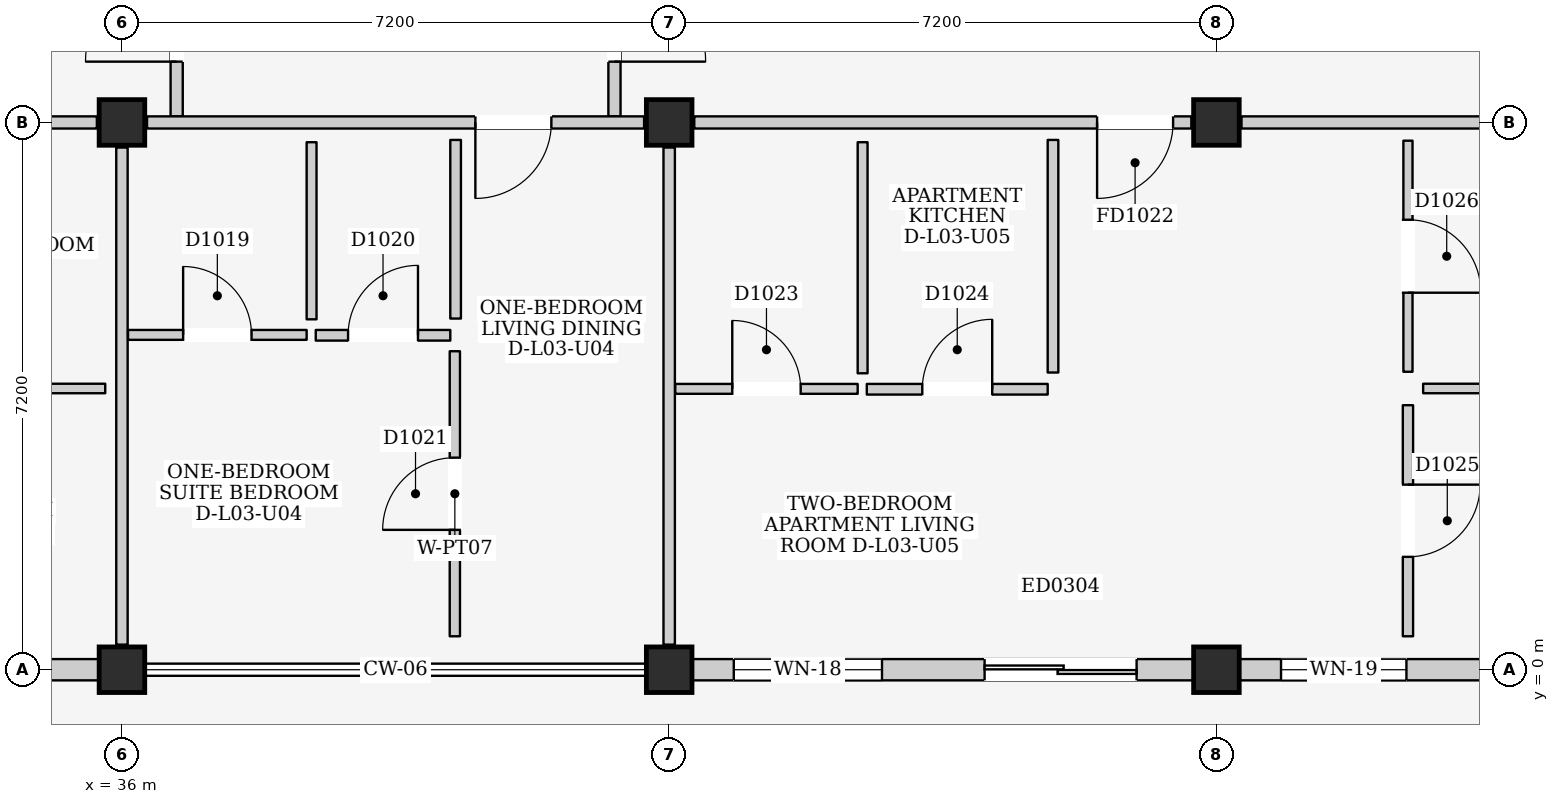
"""IFC4 building model, lengths in metres.
Left out: names, types, materials, properties, quantities, classifications, styles, units other than length and angle.
Written with IfcOpenShell. Run it as: python <this file> out.ifc"""

import sys

from ifc_helpers import new_model, si_unit, direction, frame, frame_2d, origin, origin_2d, place, context, subcontext, project, spatial, rectangle, extrude, element, fill, save


model = new_model("IFC4")
c1 = context("Model", 3, precision=1e-05, world=origin(), true_north=direction((0.0, 1.0)))
c2 = subcontext(c1, "Body", "Model", "MODEL_VIEW")
j1 = project(units=[si_unit("LENGTHUNIT", "METRE"), si_unit("PLANEANGLEUNIT", "RADIAN")], contexts=[c1])
p1 = place(None, origin())
s1 = spatial("IfcSite", under=j1, at=p1, CompositionType="ELEMENT")
p2 = place(p1, origin())
s2 = spatial("IfcBuilding", under=s1, at=p2, CompositionType="ELEMENT")
p3 = place(p2, frame((0.0, 0.0, 12.2)))
s3 = spatial("IfcBuildingStorey", under=s2, at=p3, CompositionType="ELEMENT", Elevation=12.2)
for number, where, z_axis, x_axis in (
    (1, (36.0, 0.0, 0.0), (0.0, 0.0, 1.0), (1.0, 0.0, 0.0)),
    (2, (36.0, 7.2, 0.0), (0.0, 0.0, 1.0), (1.0, 0.0, 0.0)),
    (3, (43.2, 0.0, 0.0), (0.0, 0.0, 1.0), (1.0, 0.0, 0.0)),
    (4, (43.2, 7.2, 0.0), (0.0, 0.0, 1.0), (1.0, 0.0, 0.0)),
    (5, (50.4, 0.0, 0.0), (0.0, 0.0, 1.0), (1.0, 0.0, 0.0)),
    (6, (50.4, 7.2, 0.0), (0.0, 0.0, 1.0), (1.0, 0.0, 0.0)),
):
    element("IfcColumn", number, at=place(p3, frame(where, z_axis=z_axis, x_axis=x_axis)), inside=s3, PredefinedType="COLUMN", context=c2, shape_type="SweptSolid", body=[
        extrude(rectangle(XDim=0.6, YDim=0.6, at=origin_2d()), origin(), (0.0, 0.0, 1.0), 3.2),
    ])
p4 = place(p3, frame((29.1, 0.0, 0.0), z_axis=(0.0, 0.0, 1.0), x_axis=(1.0, 0.0, 0.0)))
e7 = element("IfcWall", 7, at=p4, inside=s3, PredefinedType="ELEMENTEDWALL", context=c2, shape_type="SweptSolid", body=[
    extrude(rectangle(XDim=6.6, YDim=0.28, at=frame_2d((3.3, 0.0))), origin(), (0.0, 0.0, 1.0), 2.445),
])
p5 = place(p4, frame((3.85, 0.0, 0.0)))
e8 = element("IfcOpeningElement", 8, at=p5, cuts=e7, PredefinedType="OPENING", context=c2, shape_type="SweptSolid", body=[
    extrude(rectangle(XDim=1.5, YDim=2.12, at=frame_2d((0.75, 1.06))), frame((0.0, 0.155, 0.0), z_axis=(0.0, -1.0, 0.0), x_axis=(1.0, 0.0, 0.0)), (0.0, 0.0, 1.0), 0.31),
])
p6 = place(p4, frame((0.55, 0.0, 0.9)))
e9 = element("IfcOpeningElement", 9, at=p6, cuts=e7, PredefinedType="OPENING", context=c2, shape_type="SweptSolid", body=[
    extrude(rectangle(XDim=1.45, YDim=1.4, at=frame_2d((0.725, 0.7))), frame((0.0, 0.155, 0.0), z_axis=(0.0, -1.0, 0.0), x_axis=(1.0, 0.0, 0.0)), (0.0, 0.0, 1.0), 0.31),
])
p7 = place(p3, frame((43.5, 0.0, 0.0), z_axis=(0.0, 0.0, 1.0), x_axis=(1.0, 0.0, 0.0)))
e10 = element("IfcWall", 10, at=p7, inside=s3, PredefinedType="ELEMENTEDWALL", context=c2, shape_type="SweptSolid", body=[
    extrude(rectangle(XDim=6.6, YDim=0.28, at=frame_2d((3.3, 0.0))), origin(), (0.0, 0.0, 1.0), 2.445),
])
p8 = place(p7, frame((3.85, 0.0, 0.0)))
e11 = element("IfcOpeningElement", 11, at=p8, cuts=e10, PredefinedType="OPENING", context=c2, shape_type="SweptSolid", body=[
    extrude(rectangle(XDim=2.0, YDim=2.12, at=frame_2d((1.0, 1.06))), frame((0.0, 0.155, 0.0), z_axis=(0.0, -1.0, 0.0), x_axis=(1.0, 0.0, 0.0)), (0.0, 0.0, 1.0), 0.31),
])
p9 = place(p7, frame((0.55, 0.0, 0.785)))
e12 = element("IfcOpeningElement", 12, at=p9, cuts=e10, PredefinedType="OPENING", context=c2, shape_type="SweptSolid", body=[
    extrude(rectangle(XDim=1.95, YDim=1.55, at=frame_2d((0.975, 0.775))), frame((0.0, 0.155, 0.0), z_axis=(0.0, -1.0, 0.0), x_axis=(1.0, 0.0, 0.0)), (0.0, 0.0, 1.0), 0.31),
])
p10 = place(p3, frame((50.7, 0.0, 0.0), z_axis=(0.0, 0.0, 1.0), x_axis=(1.0, 0.0, 0.0)))
e13 = element("IfcWall", 13, at=p10, inside=s3, PredefinedType="ELEMENTEDWALL", context=c2, shape_type="SweptSolid", body=[
    extrude(rectangle(XDim=6.6, YDim=0.28, at=frame_2d((3.3, 0.0))), origin(), (0.0, 0.0, 1.0), 2.445),
])
p11 = place(p10, frame((3.85, 0.0, 0.0)))
e14 = element("IfcOpeningElement", 14, at=p11, cuts=e13, PredefinedType="OPENING", context=c2, shape_type="SweptSolid", body=[
    extrude(rectangle(XDim=1.4, YDim=2.1, at=frame_2d((0.7, 1.05))), frame((0.0, 0.155, 0.0), z_axis=(0.0, -1.0, 0.0), x_axis=(1.0, 0.0, 0.0)), (0.0, 0.0, 1.0), 0.31),
])
p12 = place(p10, frame((0.55, 0.0, 0.9)))
e15 = element("IfcOpeningElement", 15, at=p12, cuts=e13, PredefinedType="OPENING", context=c2, shape_type="SweptSolid", body=[
    extrude(rectangle(XDim=1.65, YDim=1.35, at=frame_2d((0.825, 0.675))), frame((0.0, 0.155, 0.0), z_axis=(0.0, -1.0, 0.0), x_axis=(1.0, 0.0, 0.0)), (0.0, 0.0, 1.0), 0.31),
])
p13 = place(p3, frame((36.72, 7.28, 0.0), z_axis=(0.0, 0.0, 1.0), x_axis=(0.0, 1.0, 0.0)))
e16 = element("IfcWall", 16, at=p13, inside=s3, PredefinedType="PARTITIONING", context=c2, shape_type="SweptSolid", body=[
    extrude(rectangle(XDim=4.32, YDim=0.16, at=frame_2d((2.16, 0.0))), origin(), (0.0, 0.0, 1.0), 2.98),
])
p14 = place(p13, frame((0.72, 0.0, 0.0)))
e17 = element("IfcOpeningElement", 17, at=p14, cuts=e16, PredefinedType="OPENING", context=c2, shape_type="SweptSolid", body=[
    extrude(rectangle(XDim=1.2, YDim=2.2, at=frame_2d((0.6, 1.1))), frame((0.0, 0.095, 0.0), z_axis=(0.0, -1.0, 0.0), x_axis=(1.0, 0.0, 0.0)), (0.0, 0.0, 1.0), 0.19),
])
p15 = place(p3, frame((42.48, 7.28, 0.0), z_axis=(0.0, 0.0, 1.0), x_axis=(0.0, 1.0, 0.0)))
e18 = element("IfcWall", 18, at=p15, inside=s3, PredefinedType="PARTITIONING", context=c2, shape_type="SweptSolid", body=[
    extrude(rectangle(XDim=4.32, YDim=0.16, at=frame_2d((2.16, 0.0))), origin(), (0.0, 0.0, 1.0), 2.98),
])
p16 = place(p15, frame((0.72, 0.0, 0.0)))
e19 = element("IfcOpeningElement", 19, at=p16, cuts=e18, PredefinedType="OPENING", context=c2, shape_type="SweptSolid", body=[
    extrude(rectangle(XDim=1.2, YDim=2.2, at=frame_2d((0.6, 1.1))), frame((0.0, 0.095, 0.0), z_axis=(0.0, -1.0, 0.0), x_axis=(1.0, 0.0, 0.0)), (0.0, 0.0, 1.0), 0.19),
])
p17 = place(p3, frame((29.13, 7.2, 0.0), z_axis=(0.0, 0.0, 1.0), x_axis=(1.0, 0.0, 0.0)))
e20 = element("IfcWall", 20, at=p17, inside=s3, PredefinedType="PARTITIONING", context=c2, shape_type="SweptSolid", body=[
    extrude(rectangle(XDim=6.54, YDim=0.16, at=frame_2d((3.27, 0.0))), origin(), (0.0, 0.0, 1.0), 2.365),
])
p18 = place(p17, frame((0.18, 0.0, 0.0)))
e21 = element("IfcOpeningElement", 21, at=p18, cuts=e20, PredefinedType="OPENING", context=c2, shape_type="SweptSolid", body=[
    extrude(rectangle(XDim=1.0, YDim=2.15, at=frame_2d((0.5, 1.075))), frame((0.0, 0.095, 0.0), z_axis=(0.0, -1.0, 0.0), x_axis=(1.0, 0.0, 0.0)), (0.0, 0.0, 1.0), 0.19),
])
p19 = place(p3, frame((36.0, 0.33, 0.0), z_axis=(0.0, 0.0, 1.0), x_axis=(0.0, 1.0, 0.0)))
e22 = element("IfcWall", 22, at=p19, inside=s3, PredefinedType="PARTITIONING", context=c2, shape_type="SweptSolid", body=[
    extrude(rectangle(XDim=6.54, YDim=0.15, at=frame_2d((3.27, 0.0))), origin(), (0.0, 0.0, 1.0), 2.415),
])
p20 = place(p3, frame((31.72, 3.7, 0.0), z_axis=(0.0, 0.0, 1.0), x_axis=(1.0, 0.0, 0.0)))
e23 = element("IfcWall", 23, at=p20, inside=s3, PredefinedType="PARTITIONING", context=c2, shape_type="SweptSolid", body=[
    extrude(rectangle(XDim=4.06, YDim=0.125, at=frame_2d((2.03, 0.0))), origin(), (0.0, 0.0, 1.0), 2.98),
])
p21 = place(p3, frame((36.33, 7.2, 0.0), z_axis=(0.0, 0.0, 1.0), x_axis=(1.0, 0.0, 0.0)))
e24 = element("IfcWall", 24, at=p21, inside=s3, PredefinedType="PARTITIONING", context=c2, shape_type="SweptSolid", body=[
    extrude(rectangle(XDim=6.54, YDim=0.16, at=frame_2d((3.27, 0.0))), origin(), (0.0, 0.0, 1.0), 2.365),
])
p22 = place(p21, frame((4.32, 0.0, 0.0)))
e25 = element("IfcOpeningElement", 25, at=p22, cuts=e24, PredefinedType="OPENING", context=c2, shape_type="SweptSolid", body=[
    extrude(rectangle(XDim=1.0, YDim=2.15, at=frame_2d((0.5, 1.075))), frame((0.0, 0.095, 0.0), z_axis=(0.0, -1.0, 0.0), x_axis=(1.0, 0.0, 0.0)), (0.0, 0.0, 1.0), 0.19),
])
p23 = place(p3, frame((43.2, 0.33, 0.0), z_axis=(0.0, 0.0, 1.0), x_axis=(0.0, 1.0, 0.0)))
e26 = element("IfcWall", 26, at=p23, inside=s3, PredefinedType="PARTITIONING", context=c2, shape_type="SweptSolid", body=[
    extrude(rectangle(XDim=6.54, YDim=0.15, at=frame_2d((3.27, 0.0))), origin(), (0.0, 0.0, 1.0), 2.415),
])
p24 = place(p3, frame((36.08, 4.405, 0.0), z_axis=(0.0, 0.0, 1.0), x_axis=(1.0, 0.0, 0.0)))
e27 = element("IfcWall", 27, at=p24, inside=s3, PredefinedType="PARTITIONING", context=c2, shape_type="SweptSolid", body=[
    extrude(rectangle(XDim=2.35, YDim=0.13, at=frame_2d((1.175, 0.0))), origin(), (0.0, 0.0, 1.0), 2.98),
])
p25 = place(p24, frame((0.725, 0.0, 0.0)))
e28 = element("IfcOpeningElement", 28, at=p25, cuts=e27, PredefinedType="OPENING", context=c2, shape_type="SweptSolid", body=[
    extrude(rectangle(XDim=0.9, YDim=2.1, at=frame_2d((0.45, 1.05))), frame((0.0, 0.08, 0.0), z_axis=(0.0, -1.0, 0.0), x_axis=(1.0, 0.0, 0.0)), (0.0, 0.0, 1.0), 0.16),
])
p26 = place(p3, frame((38.495, 4.61, 0.0), z_axis=(0.0, 0.0, 1.0), x_axis=(0.0, 1.0, 0.0)))
e29 = element("IfcWall", 29, at=p26, inside=s3, PredefinedType="PARTITIONING", context=c2, shape_type="SweptSolid", body=[
    extrude(rectangle(XDim=2.33, YDim=0.13, at=frame_2d((1.165, 0.0))), origin(), (0.0, 0.0, 1.0), 2.98),
])
p27 = place(p3, frame((38.55, 4.4, 0.0), z_axis=(0.0, 0.0, 1.0), x_axis=(1.0, 0.0, 0.0)))
e30 = element("IfcWall", 30, at=p27, inside=s3, PredefinedType="PARTITIONING", context=c2, shape_type="SweptSolid", body=[
    extrude(rectangle(XDim=1.77, YDim=0.14, at=frame_2d((0.885, 0.0))), origin(), (0.0, 0.0, 1.0), 2.98),
])
p28 = place(p27, frame((0.425, 0.0, 0.0)))
e31 = element("IfcOpeningElement", 31, at=p28, cuts=e30, PredefinedType="OPENING", context=c2, shape_type="SweptSolid", body=[
    extrude(rectangle(XDim=0.92, YDim=2.1, at=frame_2d((0.46, 1.05))), frame((0.0, 0.085, 0.0), z_axis=(0.0, -1.0, 0.0), x_axis=(1.0, 0.0, 0.0)), (0.0, 0.0, 1.0), 0.17),
])
p29 = place(p3, frame((40.39, 4.62, 0.0), z_axis=(0.0, 0.0, 1.0), x_axis=(0.0, 1.0, 0.0)))
e32 = element("IfcWall", 32, at=p29, inside=s3, PredefinedType="PARTITIONING", context=c2, shape_type="SweptSolid", body=[
    extrude(rectangle(XDim=2.35, YDim=0.14, at=frame_2d((1.175, 0.0))), origin(), (0.0, 0.0, 1.0), 2.98),
])
p30 = place(p3, frame((40.38, 0.44, 0.0), z_axis=(0.0, 0.0, 1.0), x_axis=(0.0, 1.0, 0.0)))
e33 = element("IfcWall", 33, at=p30, inside=s3, PredefinedType="PARTITIONING", context=c2, shape_type="SweptSolid", body=[
    extrude(rectangle(XDim=3.75, YDim=0.135, at=frame_2d((1.875, 0.0))), origin(), (0.0, 0.0, 1.0), 2.98),
])
p31 = place(p30, frame((1.4, 0.0, 0.0)))
e34 = element("IfcOpeningElement", 34, at=p31, cuts=e33, PredefinedType="OPENING", context=c2, shape_type="SweptSolid", body=[
    extrude(rectangle(XDim=0.95, YDim=2.15, at=frame_2d((0.475, 1.075))), frame((0.0, 0.083, 0.0), z_axis=(0.0, -1.0, 0.0), x_axis=(1.0, 0.0, 0.0)), (0.0, 0.0, 1.0), 0.165),
])
p32 = place(p3, frame((43.53, 7.2, 0.0), z_axis=(0.0, 0.0, 1.0), x_axis=(1.0, 0.0, 0.0)))
e35 = element("IfcWall", 35, at=p32, inside=s3, PredefinedType="PARTITIONING", context=c2, shape_type="SweptSolid", body=[
    extrude(rectangle(XDim=6.54, YDim=0.16, at=frame_2d((3.27, 0.0))), origin(), (0.0, 0.0, 1.0), 2.365),
])
p33 = place(p32, frame((5.3, 0.0, 0.0)))
e36 = element("IfcOpeningElement", 36, at=p33, cuts=e35, PredefinedType="OPENING", context=c2, shape_type="SweptSolid", body=[
    extrude(rectangle(XDim=1.0, YDim=2.15, at=frame_2d((0.5, 1.075))), frame((0.0, 0.095, 0.0), z_axis=(0.0, -1.0, 0.0), x_axis=(1.0, 0.0, 0.0)), (0.0, 0.0, 1.0), 0.19),
])
p34 = place(p3, frame((50.73, 7.2, 0.0), z_axis=(0.0, 0.0, 1.0), x_axis=(1.0, 0.0, 0.0)))
e37 = element("IfcWall", 37, at=p34, inside=s3, PredefinedType="PARTITIONING", context=c2, shape_type="SweptSolid", body=[
    extrude(rectangle(XDim=6.54, YDim=0.16, at=frame_2d((3.27, 0.0))), origin(), (0.0, 0.0, 1.0), 2.365),
])
p35 = place(p3, frame((43.28, 3.695, 0.0), z_axis=(0.0, 0.0, 1.0), x_axis=(1.0, 0.0, 0.0)))
e38 = element("IfcWall", 38, at=p35, inside=s3, PredefinedType="PARTITIONING", context=c2, shape_type="SweptSolid", body=[
    extrude(rectangle(XDim=2.4, YDim=0.13, at=frame_2d((1.2, 0.0))), origin(), (0.0, 0.0, 1.0), 2.98),
])
p36 = place(p35, frame((0.75, 0.0, 0.0)))
e39 = element("IfcOpeningElement", 39, at=p36, cuts=e38, PredefinedType="OPENING", context=c2, shape_type="SweptSolid", body=[
    extrude(rectangle(XDim=0.9, YDim=2.1, at=frame_2d((0.45, 1.05))), frame((0.0, 0.08, 0.0), z_axis=(0.0, -1.0, 0.0), x_axis=(1.0, 0.0, 0.0)), (0.0, 0.0, 1.0), 0.16),
])
p37 = place(p3, frame((45.745, 3.9, 0.0), z_axis=(0.0, 0.0, 1.0), x_axis=(0.0, 1.0, 0.0)))
e40 = element("IfcWall", 40, at=p37, inside=s3, PredefinedType="PARTITIONING", context=c2, shape_type="SweptSolid", body=[
    extrude(rectangle(XDim=3.04, YDim=0.13, at=frame_2d((1.52, 0.0))), origin(), (0.0, 0.0, 1.0), 2.98),
])
p38 = place(p3, frame((45.8, 3.69, 0.0), z_axis=(0.0, 0.0, 1.0), x_axis=(1.0, 0.0, 0.0)))
e41 = element("IfcWall", 41, at=p38, inside=s3, PredefinedType="PARTITIONING", context=c2, shape_type="SweptSolid", body=[
    extrude(rectangle(XDim=2.38, YDim=0.14, at=frame_2d((1.19, 0.0))), origin(), (0.0, 0.0, 1.0), 2.98),
])
p39 = place(p38, frame((0.73, 0.0, 0.0)))
e42 = element("IfcOpeningElement", 42, at=p39, cuts=e41, PredefinedType="OPENING", context=c2, shape_type="SweptSolid", body=[
    extrude(rectangle(XDim=0.92, YDim=2.1, at=frame_2d((0.46, 1.05))), frame((0.0, 0.085, 0.0), z_axis=(0.0, -1.0, 0.0), x_axis=(1.0, 0.0, 0.0)), (0.0, 0.0, 1.0), 0.17),
])
p40 = place(p3, frame((48.25, 3.91, 0.0), z_axis=(0.0, 0.0, 1.0), x_axis=(0.0, 1.0, 0.0)))
e43 = element("IfcWall", 43, at=p40, inside=s3, PredefinedType="PARTITIONING", context=c2, shape_type="SweptSolid", body=[
    extrude(rectangle(XDim=3.06, YDim=0.14, at=frame_2d((1.53, 0.0))), origin(), (0.0, 0.0, 1.0), 2.98),
])
p41 = place(p3, frame((52.92, 0.44, 0.0), z_axis=(0.0, 0.0, 1.0), x_axis=(0.0, 1.0, 0.0)))
e44 = element("IfcWall", 44, at=p41, inside=s3, PredefinedType="PARTITIONING", context=c2, shape_type="SweptSolid", body=[
    extrude(rectangle(XDim=3.04, YDim=0.135, at=frame_2d((1.52, 0.0))), origin(), (0.0, 0.0, 1.0), 2.98),
])
p42 = place(p41, frame((1.045, 0.0, 0.0)))
e45 = element("IfcOpeningElement", 45, at=p42, cuts=e44, PredefinedType="OPENING", context=c2, shape_type="SweptSolid", body=[
    extrude(rectangle(XDim=0.95, YDim=2.15, at=frame_2d((0.475, 1.075))), frame((0.0, 0.083, 0.0), z_axis=(0.0, -1.0, 0.0), x_axis=(1.0, 0.0, 0.0)), (0.0, 0.0, 1.0), 0.165),
])
p43 = place(p3, frame((53.12, 3.7, 0.0), z_axis=(0.0, 0.0, 1.0), x_axis=(1.0, 0.0, 0.0)))
e46 = element("IfcWall", 46, at=p43, inside=s3, PredefinedType="PARTITIONING", context=c2, shape_type="SweptSolid", body=[
    extrude(rectangle(XDim=4.06, YDim=0.125, at=frame_2d((2.03, 0.0))), origin(), (0.0, 0.0, 1.0), 2.98),
])
p44 = place(p3, frame((52.92, 3.92, 0.0), z_axis=(0.0, 0.0, 1.0), x_axis=(0.0, 1.0, 0.0)))
e47 = element("IfcWall", 47, at=p44, inside=s3, PredefinedType="PARTITIONING", context=c2, shape_type="SweptSolid", body=[
    extrude(rectangle(XDim=3.04, YDim=0.12, at=frame_2d((1.52, 0.0))), origin(), (0.0, 0.0, 1.0), 2.98),
])
p45 = place(p44, frame((1.04, 0.0, 0.0)))
e48 = element("IfcOpeningElement", 48, at=p45, cuts=e47, PredefinedType="OPENING", context=c2, shape_type="SweptSolid", body=[
    extrude(rectangle(XDim=0.96, YDim=2.15, at=frame_2d((0.48, 1.075))), frame((0.0, 0.075, 0.0), z_axis=(0.0, -1.0, 0.0), x_axis=(1.0, 0.0, 0.0)), (0.0, 0.0, 1.0), 0.15),
])
p46 = place(p8, frame((2.0, 0.0, 0.0), z_axis=(0.0, 0.0, 1.0), x_axis=(-1.0, 0.0, 0.0)))
e49 = element("IfcDoor", 49, at=p46, inside=s3, OperationType="DOUBLE_DOOR_SLIDING", PredefinedType="DOOR", context=c2, shape_type="SweptSolid", body=[
    extrude(rectangle(XDim=2.0, YDim=2.12, at=frame_2d((1.0, 1.06))), frame((0.0, 0.025, 0.0), z_axis=(0.0, -1.0, 0.0), x_axis=(1.0, 0.0, 0.0)), (0.0, 0.0, 1.0), 0.05),
])
fill(e11, e49)
p47 = place(p9, origin())
e50 = element("IfcWindow", 50, at=p47, inside=s3, PartitioningType="DOUBLE_PANEL_VERTICAL", PredefinedType="WINDOW", context=c2, shape_type="SweptSolid", body=[
    extrude(rectangle(XDim=1.95, YDim=1.55, at=frame_2d((0.975, 0.775))), frame((0.0, 0.03, 0.0), z_axis=(0.0, -1.0, 0.0), x_axis=(1.0, 0.0, 0.0)), (0.0, 0.0, 1.0), 0.06),
])
fill(e12, e50)
p48 = place(p12, origin())
e51 = element("IfcWindow", 51, at=p48, inside=s3, PartitioningType="DOUBLE_PANEL_VERTICAL", PredefinedType="WINDOW", context=c2, shape_type="SweptSolid", body=[
    extrude(rectangle(XDim=1.65, YDim=1.35, at=frame_2d((0.825, 0.675))), frame((0.0, 0.03, 0.0), z_axis=(0.0, -1.0, 0.0), x_axis=(1.0, 0.0, 0.0)), (0.0, 0.0, 1.0), 0.06),
])
fill(e15, e51)
p49 = place(p14, origin())
e52 = element("IfcDoor", 52, at=p49, inside=s3, OperationType="SINGLE_SWING_LEFT", PredefinedType="DOOR", context=c2, shape_type="SweptSolid", body=[
    extrude(rectangle(XDim=1.2, YDim=2.2, at=frame_2d((0.6, 1.1))), frame((0.0, 0.025, 0.0), z_axis=(0.0, -1.0, 0.0), x_axis=(1.0, 0.0, 0.0)), (0.0, 0.0, 1.0), 0.05),
])
fill(e17, e52)
p50 = place(p16, frame((1.2, 0.0, 0.0), z_axis=(0.0, 0.0, 1.0), x_axis=(-1.0, 0.0, 0.0)))
e53 = element("IfcDoor", 53, at=p50, inside=s3, OperationType="SINGLE_SWING_RIGHT", PredefinedType="DOOR", context=c2, shape_type="SweptSolid", body=[
    extrude(rectangle(XDim=1.2, YDim=2.2, at=frame_2d((0.6, 1.1))), frame((0.0, 0.025, 0.0), z_axis=(0.0, -1.0, 0.0), x_axis=(1.0, 0.0, 0.0)), (0.0, 0.0, 1.0), 0.05),
])
fill(e19, e53)
p51 = place(p22, frame((1.0, 0.0, 0.0), z_axis=(0.0, 0.0, 1.0), x_axis=(-1.0, 0.0, 0.0)))
e54 = element("IfcDoor", 54, at=p51, inside=s3, OperationType="SINGLE_SWING_RIGHT", PredefinedType="DOOR", context=c2, shape_type="SweptSolid", body=[
    extrude(rectangle(XDim=1.0, YDim=2.15, at=frame_2d((0.5, 1.075))), frame((0.0, 0.025, 0.0), z_axis=(0.0, -1.0, 0.0), x_axis=(1.0, 0.0, 0.0)), (0.0, 0.0, 1.0), 0.05),
])
fill(e25, e54)
p52 = place(p25, origin())
e55 = element("IfcDoor", 55, at=p52, inside=s3, OperationType="SINGLE_SWING_LEFT", PredefinedType="DOOR", context=c2, shape_type="SweptSolid", body=[
    extrude(rectangle(XDim=0.9, YDim=2.1, at=frame_2d((0.45, 1.05))), frame((0.0, 0.025, 0.0), z_axis=(0.0, -1.0, 0.0), x_axis=(1.0, 0.0, 0.0)), (0.0, 0.0, 1.0), 0.05),
])
fill(e28, e55)
p53 = place(p28, origin())
e56 = element("IfcDoor", 56, at=p53, inside=s3, OperationType="SINGLE_SWING_RIGHT", PredefinedType="DOOR", context=c2, shape_type="SweptSolid", body=[
    extrude(rectangle(XDim=0.92, YDim=2.1, at=frame_2d((0.46, 1.05))), frame((0.0, 0.025, 0.0), z_axis=(0.0, -1.0, 0.0), x_axis=(1.0, 0.0, 0.0)), (0.0, 0.0, 1.0), 0.05),
])
fill(e31, e56)
p54 = place(p31, origin())
e57 = element("IfcDoor", 57, at=p54, inside=s3, OperationType="SINGLE_SWING_LEFT", PredefinedType="DOOR", context=c2, shape_type="SweptSolid", body=[
    extrude(rectangle(XDim=0.95, YDim=2.15, at=frame_2d((0.475, 1.075))), frame((0.0, 0.025, 0.0), z_axis=(0.0, -1.0, 0.0), x_axis=(1.0, 0.0, 0.0)), (0.0, 0.0, 1.0), 0.05),
])
fill(e34, e57)
p55 = place(p33, frame((1.0, 0.0, 0.0), z_axis=(0.0, 0.0, 1.0), x_axis=(-1.0, 0.0, 0.0)))
e58 = element("IfcDoor", 58, at=p55, inside=s3, OperationType="SINGLE_SWING_RIGHT", PredefinedType="DOOR", context=c2, shape_type="SweptSolid", body=[
    extrude(rectangle(XDim=1.0, YDim=2.15, at=frame_2d((0.5, 1.075))), frame((0.0, 0.025, 0.0), z_axis=(0.0, -1.0, 0.0), x_axis=(1.0, 0.0, 0.0)), (0.0, 0.0, 1.0), 0.05),
])
fill(e36, e58)
p56 = place(p36, origin())
e59 = element("IfcDoor", 59, at=p56, inside=s3, OperationType="SINGLE_SWING_LEFT", PredefinedType="DOOR", context=c2, shape_type="SweptSolid", body=[
    extrude(rectangle(XDim=0.9, YDim=2.1, at=frame_2d((0.45, 1.05))), frame((0.0, 0.025, 0.0), z_axis=(0.0, -1.0, 0.0), x_axis=(1.0, 0.0, 0.0)), (0.0, 0.0, 1.0), 0.05),
])
fill(e39, e59)
p57 = place(p39, origin())
e60 = element("IfcDoor", 60, at=p57, inside=s3, OperationType="SINGLE_SWING_RIGHT", PredefinedType="DOOR", context=c2, shape_type="SweptSolid", body=[
    extrude(rectangle(XDim=0.92, YDim=2.1, at=frame_2d((0.46, 1.05))), frame((0.0, 0.025, 0.0), z_axis=(0.0, -1.0, 0.0), x_axis=(1.0, 0.0, 0.0)), (0.0, 0.0, 1.0), 0.05),
])
fill(e42, e60)
p58 = place(p42, frame((0.95, 0.0, 0.0), z_axis=(0.0, 0.0, 1.0), x_axis=(-1.0, 0.0, 0.0)))
e61 = element("IfcDoor", 61, at=p58, inside=s3, OperationType="SINGLE_SWING_LEFT", PredefinedType="DOOR", context=c2, shape_type="SweptSolid", body=[
    extrude(rectangle(XDim=0.95, YDim=2.15, at=frame_2d((0.475, 1.075))), frame((0.0, 0.025, 0.0), z_axis=(0.0, -1.0, 0.0), x_axis=(1.0, 0.0, 0.0)), (0.0, 0.0, 1.0), 0.05),
])
fill(e45, e61)
p59 = place(p45, frame((0.96, 0.0, 0.0), z_axis=(0.0, 0.0, 1.0), x_axis=(-1.0, 0.0, 0.0)))
e62 = element("IfcDoor", 62, at=p59, inside=s3, OperationType="SINGLE_SWING_RIGHT", PredefinedType="DOOR", context=c2, shape_type="SweptSolid", body=[
    extrude(rectangle(XDim=0.96, YDim=2.15, at=frame_2d((0.48, 1.075))), frame((0.0, 0.025, 0.0), z_axis=(0.0, -1.0, 0.0), x_axis=(1.0, 0.0, 0.0)), (0.0, 0.0, 1.0), 0.05),
])
fill(e48, e62)
save(model, sys.argv[1])
